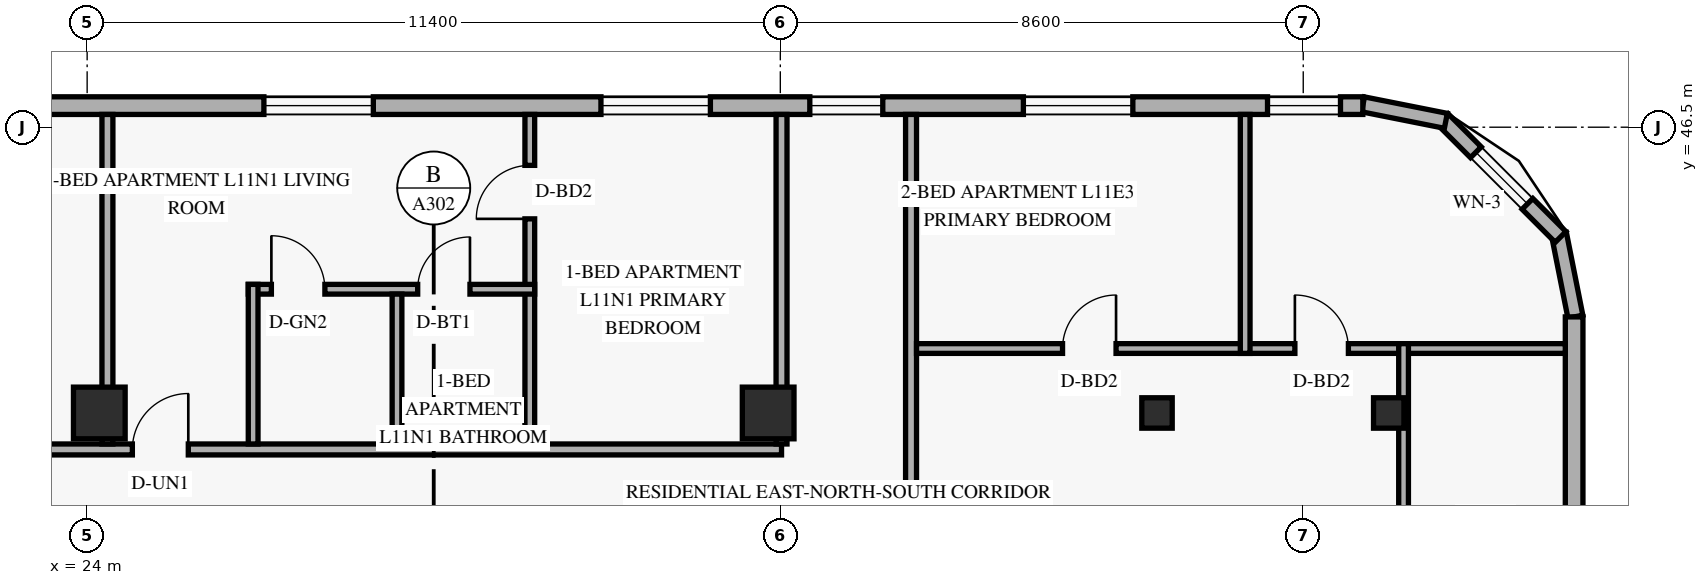
"""IFC4 building model, lengths in metres.
Left out: names, types, materials, properties, quantities, classifications, styles, units other than length and angle.
Written with IfcOpenShell. Run it as: python <this file> out.ifc"""

import sys

from ifc_helpers import new_model, si_unit, direction, frame, frame_2d, origin, origin_2d, place, context, subcontext, project, spatial, rectangle, hollow_rectangle, extrude, element, fill, save


model = new_model("IFC4")
c1 = context("Model", 3, precision=1e-05, world=origin(), true_north=direction((0.0, 1.0)))
c2 = subcontext(c1, "Body", "Model", "MODEL_VIEW")
j1 = project(units=[si_unit("LENGTHUNIT", "METRE"), si_unit("PLANEANGLEUNIT", "RADIAN")], contexts=[c1])
p1 = place(None, origin())
s1 = spatial("IfcSite", under=j1, at=p1, CompositionType="ELEMENT")
p2 = place(p1, origin())
s2 = spatial("IfcBuilding", under=s1, at=p2, CompositionType="ELEMENT")
p3 = place(p2, frame((0.0, 0.0, 45.6)))
s3 = spatial("IfcBuildingStorey", under=s2, at=p3, CompositionType="ELEMENT", Elevation=45.6)
for number, where, z_axis, x_axis in (
    (1, (24.2, 41.8, 0.0), (0.0, 0.0, 1.0), (1.0, 0.0, 0.0)),
    (2, (35.2, 41.8, 0.0), (0.0, 0.0, 1.0), (1.0, 0.0, 0.0)),
):
    element("IfcColumn", number, at=place(p3, frame(where, z_axis=z_axis, x_axis=x_axis)), inside=s3, PredefinedType="COLUMN", context=c2, shape_type="SweptSolid", body=[
        extrude(rectangle(XDim=0.85, YDim=0.85, at=origin_2d()), origin(), (0.0, 0.0, 1.0), 3.6),
    ])
p4 = place(p3, frame((41.532, 41.8, 0.0), z_axis=(0.034973505036, 0.0, 0.999388239847), x_axis=(0.0, 1.0, 0.0)))
e3 = element("IfcColumn", 3, at=p4, inside=s3, PredefinedType="COLUMN", context=c2, shape_type="SweptSolid", body=[
    extrude(hollow_rectangle(XDim=0.5, YDim=0.5, WallThickness=0.022, at=origin_2d()), origin(), (0.0, 0.0, 1.0), 3.602),
])
p5 = place(p3, frame((45.302, 41.8, 0.0), z_axis=(0.057955997462, 0.0, 0.998319138531), x_axis=(0.0, 1.0, 0.0)))
e4 = element("IfcColumn", 4, at=p5, inside=s3, PredefinedType="COLUMN", context=c2, shape_type="SweptSolid", body=[
    extrude(hollow_rectangle(XDim=0.5, YDim=0.5, WallThickness=0.022, at=origin_2d()), origin(), (0.0, 0.0, 1.0), 3.606),
])
p6 = place(p3, frame((48.476, 43.384, 0.0), z_axis=(0.0, 0.0, 1.0), x_axis=(-0.19496651342, 0.980809899341, 0.0)))
e5 = element("IfcWall", 5, at=p6, inside=s3, PredefinedType="SOLIDWALL", context=c2, shape_type="SweptSolid", body=[
    extrude(rectangle(XDim=1.389, YDim=0.25, at=frame_2d((0.694, 0.0))), origin(), (0.0, 0.0, 1.0), 3.36),
])
p7 = place(p3, frame((48.232, 44.695, 0.0), z_axis=(0.0, 0.0, 1.0), x_axis=(-0.707106781187, 0.707106781187, 0.0)))
e6 = element("IfcWall", 6, at=p7, inside=s3, PredefinedType="SOLIDWALL", context=c2, shape_type="SweptSolid", body=[
    extrude(rectangle(XDim=2.739, YDim=0.25, at=frame_2d((1.37, 0.0))), origin(), (0.0, 0.0, 1.0), 3.36),
])
p8 = place(p7, frame((0.77, 0.0, 0.85)))
e7 = element("IfcOpeningElement", 7, at=p8, cuts=e6, PredefinedType="OPENING", context=c2, shape_type="SweptSolid", body=[
    extrude(rectangle(XDim=1.2, YDim=1.5, at=frame_2d((0.6, 0.75))), frame((0.0, 0.135, 0.0), z_axis=(0.0, -1.0, 0.0), x_axis=(1.0, 0.0, 0.0)), (0.0, 0.0, 1.0), 0.27),
])
p9 = place(p3, frame((46.345, 46.605, 0.0), z_axis=(0.0, 0.0, 1.0), x_axis=(-0.980809899341, 0.19496651342, 0.0)))
e8 = element("IfcWall", 8, at=p9, inside=s3, PredefinedType="SOLIDWALL", context=c2, shape_type="SweptSolid", body=[
    extrude(rectangle(XDim=1.389, YDim=0.25, at=frame_2d((0.694, 0.0))), origin(), (0.0, 0.0, 1.0), 3.36),
])
p10 = place(p3, frame((48.455, 4.62, 0.0), z_axis=(0.0, 0.0, 1.0), x_axis=(0.0, 1.0, 0.0)))
e9 = element("IfcWall", 9, at=p10, inside=s3, PredefinedType="SOLIDWALL", context=c2, shape_type="SweptSolid", body=[
    extrude(rectangle(XDim=38.76, YDim=0.29, at=frame_2d((19.38, 0.0))), origin(), (0.0, 0.0, 1.0), 3.36),
])
p11 = place(p10, frame((5.64, 0.0, 0.85)))
e10 = element("IfcOpeningElement", 10, at=p11, cuts=e9, PredefinedType="OPENING", context=c2, shape_type="SweptSolid", body=[
    extrude(rectangle(XDim=1.2, YDim=1.5, at=frame_2d((0.6, 0.75))), frame((0.0, 0.155, 0.0), z_axis=(0.0, -1.0, 0.0), x_axis=(1.0, 0.0, 0.0)), (0.0, 0.0, 1.0), 0.31),
])
p12 = place(p10, frame((13.784, 0.0, 0.85)))
e11 = element("IfcOpeningElement", 11, at=p12, cuts=e9, PredefinedType="OPENING", context=c2, shape_type="SweptSolid", body=[
    extrude(rectangle(XDim=1.2, YDim=1.5, at=frame_2d((0.6, 0.75))), frame((0.0, 0.155, 0.0), z_axis=(0.0, -1.0, 0.0), x_axis=(1.0, 0.0, 0.0)), (0.0, 0.0, 1.0), 0.31),
])
p13 = place(p10, frame((19.359, 0.0, 0.85)))
e12 = element("IfcOpeningElement", 12, at=p13, cuts=e9, PredefinedType="OPENING", context=c2, shape_type="SweptSolid", body=[
    extrude(rectangle(XDim=1.2, YDim=1.5, at=frame_2d((0.6, 0.75))), frame((0.0, 0.155, 0.0), z_axis=(0.0, -1.0, 0.0), x_axis=(1.0, 0.0, 0.0)), (0.0, 0.0, 1.0), 0.31),
])
p14 = place(p10, frame((25.275, 0.0, 0.85)))
e13 = element("IfcOpeningElement", 13, at=p14, cuts=e9, PredefinedType="OPENING", context=c2, shape_type="SweptSolid", body=[
    extrude(rectangle(XDim=1.2, YDim=1.5, at=frame_2d((0.6, 0.75))), frame((0.0, 0.155, 0.0), z_axis=(0.0, -1.0, 0.0), x_axis=(1.0, 0.0, 0.0)), (0.0, 0.0, 1.0), 0.31),
])
p15 = place(p10, frame((32.58, 0.0, 0.85)))
e14 = element("IfcOpeningElement", 14, at=p15, cuts=e9, PredefinedType="OPENING", context=c2, shape_type="SweptSolid", body=[
    extrude(rectangle(XDim=1.2, YDim=1.5, at=frame_2d((0.6, 0.75))), frame((0.0, 0.155, 0.0), z_axis=(0.0, -1.0, 0.0), x_axis=(1.0, 0.0, 0.0)), (0.0, 0.0, 1.0), 0.31),
])
p16 = place(p3, frame((44.98, 46.855, 0.0), z_axis=(0.0, 0.0, 1.0), x_axis=(-1.0, 0.0, 0.0)))
e15 = element("IfcWall", 15, at=p16, inside=s3, PredefinedType="SOLIDWALL", context=c2, shape_type="SweptSolid", body=[
    extrude(rectangle(XDim=39.56, YDim=0.29, at=frame_2d((19.78, 0.0))), origin(), (0.0, 0.0, 1.0), 3.36),
])
p17 = place(p16, frame((35.22, 0.0, 0.85)))
e16 = element("IfcOpeningElement", 16, at=p17, cuts=e15, PredefinedType="OPENING", context=c2, shape_type="SweptSolid", body=[
    extrude(rectangle(XDim=1.8, YDim=1.6, at=frame_2d((0.9, 0.8))), frame((0.0, 0.155, 0.0), z_axis=(0.0, -1.0, 0.0), x_axis=(1.0, 0.0, 0.0)), (0.0, 0.0, 1.0), 0.31),
])
p18 = place(p16, frame((31.18, 0.0, 0.85)))
e17 = element("IfcOpeningElement", 17, at=p18, cuts=e15, PredefinedType="OPENING", context=c2, shape_type="SweptSolid", body=[
    extrude(rectangle(XDim=1.2, YDim=1.5, at=frame_2d((0.6, 0.75))), frame((0.0, 0.155, 0.0), z_axis=(0.0, -1.0, 0.0), x_axis=(1.0, 0.0, 0.0)), (0.0, 0.0, 1.0), 0.31),
])
p19 = place(p16, frame((24.863, 0.0, 0.85)))
e18 = element("IfcOpeningElement", 18, at=p19, cuts=e15, PredefinedType="OPENING", context=c2, shape_type="SweptSolid", body=[
    extrude(rectangle(XDim=1.8, YDim=1.6, at=frame_2d((0.9, 0.8))), frame((0.0, 0.155, 0.0), z_axis=(0.0, -1.0, 0.0), x_axis=(1.0, 0.0, 0.0)), (0.0, 0.0, 1.0), 0.31),
])
p20 = place(p16, frame((16.273, 0.0, 0.85)))
e19 = element("IfcOpeningElement", 19, at=p20, cuts=e15, PredefinedType="OPENING", context=c2, shape_type="SweptSolid", body=[
    extrude(rectangle(XDim=1.8, YDim=1.6, at=frame_2d((0.9, 0.8))), frame((0.0, 0.155, 0.0), z_axis=(0.0, -1.0, 0.0), x_axis=(1.0, 0.0, 0.0)), (0.0, 0.0, 1.0), 0.31),
])
p21 = place(p16, frame((10.73, 0.0, 0.85)))
e20 = element("IfcOpeningElement", 20, at=p21, cuts=e15, PredefinedType="OPENING", context=c2, shape_type="SweptSolid", body=[
    extrude(rectangle(XDim=1.8, YDim=1.6, at=frame_2d((0.9, 0.8))), frame((0.0, 0.155, 0.0), z_axis=(0.0, -1.0, 0.0), x_axis=(1.0, 0.0, 0.0)), (0.0, 0.0, 1.0), 0.31),
])
p22 = place(p16, frame((7.895, 0.0, 0.85)))
e21 = element("IfcOpeningElement", 21, at=p22, cuts=e15, PredefinedType="OPENING", context=c2, shape_type="SweptSolid", body=[
    extrude(rectangle(XDim=1.2, YDim=1.5, at=frame_2d((0.6, 0.75))), frame((0.0, 0.155, 0.0), z_axis=(0.0, -1.0, 0.0), x_axis=(1.0, 0.0, 0.0)), (0.0, 0.0, 1.0), 0.31),
])
p23 = place(p16, frame((3.782, 0.0, 0.85)))
e22 = element("IfcOpeningElement", 22, at=p23, cuts=e15, PredefinedType="OPENING", context=c2, shape_type="SweptSolid", body=[
    extrude(rectangle(XDim=1.8, YDim=1.6, at=frame_2d((0.9, 0.8))), frame((0.0, 0.155, 0.0), z_axis=(0.0, -1.0, 0.0), x_axis=(1.0, 0.0, 0.0)), (0.0, 0.0, 1.0), 0.31),
])
p24 = place(p16, frame((0.367, 0.0, 0.85)))
e23 = element("IfcOpeningElement", 23, at=p24, cuts=e15, PredefinedType="OPENING", context=c2, shape_type="SweptSolid", body=[
    extrude(rectangle(XDim=1.2, YDim=1.5, at=frame_2d((0.6, 0.75))), frame((0.0, 0.155, 0.0), z_axis=(0.0, -1.0, 0.0), x_axis=(1.0, 0.0, 0.0)), (0.0, 0.0, 1.0), 0.31),
])
p25 = place(p3, frame((37.55, 1.29, 0.0), z_axis=(0.0, 0.0, 1.0), x_axis=(0.0, 1.0, 0.0)))
e24 = element("IfcWall", 24, at=p25, inside=s3, PredefinedType="STANDARD", context=c2, shape_type="SweptSolid", body=[
    extrude(rectangle(XDim=45.42, YDim=0.18, at=frame_2d((22.71, 0.0))), origin(), (0.0, 0.0, 1.0), 2.649),
])
p26 = place(p25, frame((13.943, 0.0, 0.0)))
e25 = element("IfcOpeningElement", 25, at=p26, cuts=e24, PredefinedType="OPENING", context=c2, shape_type="SweptSolid", body=[
    extrude(rectangle(XDim=0.92, YDim=2.15, at=frame_2d((0.46, 1.075))), frame((0.0, 0.1, 0.0), z_axis=(0.0, -1.0, 0.0), x_axis=(1.0, 0.0, 0.0)), (0.0, 0.0, 1.0), 0.2),
])
p27 = place(p25, frame((20.953, 0.0, 0.0)))
e26 = element("IfcOpeningElement", 26, at=p27, cuts=e24, PredefinedType="OPENING", context=c2, shape_type="SweptSolid", body=[
    extrude(rectangle(XDim=0.92, YDim=2.15, at=frame_2d((0.46, 1.075))), frame((0.0, 0.1, 0.0), z_axis=(0.0, -1.0, 0.0), x_axis=(1.0, 0.0, 0.0)), (0.0, 0.0, 1.0), 0.2),
])
p28 = place(p25, frame((36.635, 0.0, 0.0)))
e27 = element("IfcOpeningElement", 27, at=p28, cuts=e24, PredefinedType="OPENING", context=c2, shape_type="SweptSolid", body=[
    extrude(rectangle(XDim=0.92, YDim=2.15, at=frame_2d((0.46, 1.075))), frame((0.0, 0.1, 0.0), z_axis=(0.0, -1.0, 0.0), x_axis=(1.0, 0.0, 0.0)), (0.0, 0.0, 1.0), 0.2),
])
p29 = place(p3, frame((14.1, 41.2, 0.0), z_axis=(0.0, 0.0, 1.0), x_axis=(1.0, 0.0, 0.0)))
e28 = element("IfcWall", 28, at=p29, inside=s3, PredefinedType="STANDARD", context=c2, shape_type="SweptSolid", body=[
    extrude(rectangle(XDim=21.32, YDim=0.18, at=frame_2d((10.66, 0.0))), origin(), (0.0, 0.0, 1.0), 2.649),
])
p30 = place(p29, frame((1.6, 0.0, 0.0)))
e29 = element("IfcOpeningElement", 29, at=p30, cuts=e28, PredefinedType="OPENING", context=c2, shape_type="SweptSolid", body=[
    extrude(rectangle(XDim=0.95, YDim=2.15, at=frame_2d((0.475, 1.075))), frame((0.0, 0.1, 0.0), z_axis=(0.0, -1.0, 0.0), x_axis=(1.0, 0.0, 0.0)), (0.0, 0.0, 1.0), 0.2),
])
p31 = place(p29, frame((10.644, 0.0, 0.0)))
e30 = element("IfcOpeningElement", 30, at=p31, cuts=e28, PredefinedType="OPENING", context=c2, shape_type="SweptSolid", body=[
    extrude(rectangle(XDim=0.92, YDim=2.15, at=frame_2d((0.46, 1.075))), frame((0.0, 0.1, 0.0), z_axis=(0.0, -1.0, 0.0), x_axis=(1.0, 0.0, 0.0)), (0.0, 0.0, 1.0), 0.2),
])
p32 = place(p3, frame((35.42, 41.29, 0.0), z_axis=(0.0, 0.0, 1.0), x_axis=(0.0, 1.0, 0.0)))
e31 = element("IfcWall", 31, at=p32, inside=s3, PredefinedType="PARTITIONING", context=c2, shape_type="SweptSolid", body=[
    extrude(rectangle(XDim=5.42, YDim=0.18, at=frame_2d((2.71, 0.0))), origin(), (0.0, 0.0, 1.0), 3.36),
])
p33 = place(p3, frame((37.64, 42.86, 0.0), z_axis=(0.0, 0.0, 1.0), x_axis=(1.0, 0.0, 0.0)))
e32 = element("IfcWall", 32, at=p33, inside=s3, PredefinedType="PARTITIONING", context=c2, shape_type="SweptSolid", body=[
    extrude(rectangle(XDim=10.67, YDim=0.16, at=frame_2d((5.335, 0.0))), origin(), (0.0, 0.0, 1.0), 3.36),
])
p34 = place(p33, frame((2.402, 0.0, 0.0)))
e33 = element("IfcOpeningElement", 33, at=p34, cuts=e32, PredefinedType="OPENING", context=c2, shape_type="SweptSolid", body=[
    extrude(rectangle(XDim=0.88, YDim=2.14, at=frame_2d((0.44, 1.07))), frame((0.0, 0.09, 0.0), z_axis=(0.0, -1.0, 0.0), x_axis=(1.0, 0.0, 0.0)), (0.0, 0.0, 1.0), 0.18),
])
p35 = place(p33, frame((6.222, 0.0, 0.0)))
e34 = element("IfcOpeningElement", 34, at=p35, cuts=e32, PredefinedType="OPENING", context=c2, shape_type="SweptSolid", body=[
    extrude(rectangle(XDim=0.88, YDim=2.14, at=frame_2d((0.44, 1.07))), frame((0.0, 0.09, 0.0), z_axis=(0.0, -1.0, 0.0), x_axis=(1.0, 0.0, 0.0)), (0.0, 0.0, 1.0), 0.18),
])
p36 = place(p3, frame((45.65, 32.38, 0.0), z_axis=(0.0, 0.0, 1.0), x_axis=(0.0, 1.0, 0.0)))
e35 = element("IfcWall", 35, at=p36, inside=s3, PredefinedType="PARTITIONING", context=c2, shape_type="SweptSolid", body=[
    extrude(rectangle(XDim=10.56, YDim=0.16, at=frame_2d((5.28, 0.0))), origin(), (0.0, 0.0, 1.0), 2.809),
])
p37 = place(p36, frame((4.52, 0.0, 0.0)))
e36 = element("IfcOpeningElement", 36, at=p37, cuts=e35, PredefinedType="OPENING", context=c2, shape_type="SweptSolid", body=[
    extrude(rectangle(XDim=0.95, YDim=2.15, at=frame_2d((0.475, 1.075))), frame((0.0, 0.09, 0.0), z_axis=(0.0, -1.0, 0.0), x_axis=(1.0, 0.0, 0.0)), (0.0, 0.0, 1.0), 0.18),
])
p38 = place(p3, frame((43.045, 42.78, 0.0), z_axis=(0.0, 0.0, 1.0), x_axis=(0.0, 1.0, 0.0)))
e37 = element("IfcWall", 37, at=p38, inside=s3, PredefinedType="PARTITIONING", context=c2, shape_type="SweptSolid", body=[
    extrude(rectangle(XDim=3.93, YDim=0.16, at=frame_2d((1.965, 0.0))), origin(), (0.0, 0.0, 1.0), 3.36),
])
p39 = place(p3, frame((24.333, 41.29, 0.0), z_axis=(0.0, 0.0, 1.0), x_axis=(0.0, 1.0, 0.0)))
e38 = element("IfcWall", 38, at=p39, inside=s3, PredefinedType="PARTITIONING", context=c2, shape_type="SweptSolid", body=[
    extrude(rectangle(XDim=5.42, YDim=0.18, at=frame_2d((2.71, 0.0))), origin(), (0.0, 0.0, 1.0), 2.649),
])
p40 = place(p3, frame((31.28, 41.29, 0.0), z_axis=(0.0, 0.0, 1.0), x_axis=(0.0, 1.0, 0.0)))
e39 = element("IfcWall", 39, at=p40, inside=s3, PredefinedType="PARTITIONING", context=c2, shape_type="SweptSolid", body=[
    extrude(rectangle(XDim=5.42, YDim=0.16, at=frame_2d((2.71, 0.0))), origin(), (0.0, 0.0, 1.0), 2.809),
])
p41 = place(p40, frame((3.702, 0.0, 0.0)))
e40 = element("IfcOpeningElement", 40, at=p41, cuts=e39, PredefinedType="OPENING", context=c2, shape_type="SweptSolid", body=[
    extrude(rectangle(XDim=0.88, YDim=2.14, at=frame_2d((0.44, 1.07))), frame((0.0, 0.09, 0.0), z_axis=(0.0, -1.0, 0.0), x_axis=(1.0, 0.0, 0.0)), (0.0, 0.0, 1.0), 0.18),
])
p42 = place(p3, frame((26.65, 43.835, 0.0), z_axis=(0.0, 0.0, 1.0), x_axis=(1.0, 0.0, 0.0)))
e41 = element("IfcWall", 41, at=p42, inside=s3, PredefinedType="PLUMBINGWALL", context=c2, shape_type="SweptSolid", body=[
    extrude(rectangle(XDim=4.71, YDim=0.16, at=frame_2d((2.355, 0.0))), origin(), (0.0, 0.0, 1.0), 3.36),
])
p43 = place(p42, frame((0.38, 0.0, 0.0)))
e42 = element("IfcOpeningElement", 42, at=p43, cuts=e41, PredefinedType="OPENING", context=c2, shape_type="SweptSolid", body=[
    extrude(rectangle(XDim=0.88, YDim=2.12, at=frame_2d((0.44, 1.06))), frame((0.0, 0.09, 0.0), z_axis=(0.0, -1.0, 0.0), x_axis=(1.0, 0.0, 0.0)), (0.0, 0.0, 1.0), 0.18),
])
p44 = place(p42, frame((2.786, 0.0, 0.0)))
e43 = element("IfcOpeningElement", 43, at=p44, cuts=e41, PredefinedType="OPENING", context=c2, shape_type="SweptSolid", body=[
    extrude(rectangle(XDim=0.86, YDim=2.12, at=frame_2d((0.43, 1.06))), frame((0.0, 0.09, 0.0), z_axis=(0.0, -1.0, 0.0), x_axis=(1.0, 0.0, 0.0)), (0.0, 0.0, 1.0), 0.18),
])
p45 = place(p3, frame((26.73, 41.29, 0.0), z_axis=(0.0, 0.0, 1.0), x_axis=(0.0, 1.0, 0.0)))
e44 = element("IfcWall", 44, at=p45, inside=s3, PredefinedType="PLUMBINGWALL", context=c2, shape_type="SweptSolid", body=[
    extrude(rectangle(XDim=2.625, YDim=0.16, at=frame_2d((1.312, 0.0))), origin(), (0.0, 0.0, 1.0), 2.809),
])
p46 = place(p3, frame((29.096, 41.29, 0.0), z_axis=(0.0, 0.0, 1.0), x_axis=(0.0, 1.0, 0.0)))
e45 = element("IfcWall", 45, at=p46, inside=s3, PredefinedType="PLUMBINGWALL", context=c2, shape_type="SweptSolid", body=[
    extrude(rectangle(XDim=2.465, YDim=0.16, at=frame_2d((1.232, 0.0))), origin(), (0.0, 0.0, 1.0), 2.809),
])
p47 = place(p8, origin())
e46 = element("IfcWindow", 46, at=p47, inside=s3, PartitioningType="SINGLE_PANEL", PredefinedType="WINDOW", context=c2, shape_type="SweptSolid", body=[
    extrude(rectangle(XDim=1.2, YDim=1.5, at=frame_2d((0.6, 0.75))), frame((0.0, 0.03, 0.0), z_axis=(0.0, -1.0, 0.0), x_axis=(1.0, 0.0, 0.0)), (0.0, 0.0, 1.0), 0.06),
])
fill(e7, e46)
p48 = place(p20, origin())
e47 = element("IfcWindow", 47, at=p48, inside=s3, PartitioningType="SINGLE_PANEL", PredefinedType="WINDOW", context=c2, shape_type="SweptSolid", body=[
    extrude(rectangle(XDim=1.8, YDim=1.6, at=frame_2d((0.9, 0.8))), frame((0.0, 0.03, 0.0), z_axis=(0.0, -1.0, 0.0), x_axis=(1.0, 0.0, 0.0)), (0.0, 0.0, 1.0), 0.06),
])
fill(e19, e47)
p49 = place(p21, origin())
e48 = element("IfcWindow", 48, at=p49, inside=s3, PartitioningType="SINGLE_PANEL", PredefinedType="WINDOW", context=c2, shape_type="SweptSolid", body=[
    extrude(rectangle(XDim=1.8, YDim=1.6, at=frame_2d((0.9, 0.8))), frame((0.0, 0.03, 0.0), z_axis=(0.0, -1.0, 0.0), x_axis=(1.0, 0.0, 0.0)), (0.0, 0.0, 1.0), 0.06),
])
fill(e20, e48)
p50 = place(p22, origin())
e49 = element("IfcWindow", 49, at=p50, inside=s3, PartitioningType="SINGLE_PANEL", PredefinedType="WINDOW", context=c2, shape_type="SweptSolid", body=[
    extrude(rectangle(XDim=1.2, YDim=1.5, at=frame_2d((0.6, 0.75))), frame((0.0, 0.03, 0.0), z_axis=(0.0, -1.0, 0.0), x_axis=(1.0, 0.0, 0.0)), (0.0, 0.0, 1.0), 0.06),
])
fill(e21, e49)
p51 = place(p23, origin())
e50 = element("IfcWindow", 50, at=p51, inside=s3, PartitioningType="SINGLE_PANEL", PredefinedType="WINDOW", context=c2, shape_type="SweptSolid", body=[
    extrude(rectangle(XDim=1.8, YDim=1.6, at=frame_2d((0.9, 0.8))), frame((0.0, 0.03, 0.0), z_axis=(0.0, -1.0, 0.0), x_axis=(1.0, 0.0, 0.0)), (0.0, 0.0, 1.0), 0.06),
])
fill(e22, e50)
p52 = place(p24, origin())
e51 = element("IfcWindow", 51, at=p52, inside=s3, PartitioningType="SINGLE_PANEL", PredefinedType="WINDOW", context=c2, shape_type="SweptSolid", body=[
    extrude(rectangle(XDim=1.2, YDim=1.5, at=frame_2d((0.6, 0.75))), frame((0.0, 0.03, 0.0), z_axis=(0.0, -1.0, 0.0), x_axis=(1.0, 0.0, 0.0)), (0.0, 0.0, 1.0), 0.06),
])
fill(e23, e51)
p53 = place(p34, origin())
e52 = element("IfcDoor", 52, at=p53, inside=s3, OperationType="SINGLE_SWING_RIGHT", PredefinedType="DOOR", context=c2, shape_type="SweptSolid", body=[
    extrude(rectangle(XDim=0.88, YDim=2.14, at=frame_2d((0.44, 1.07))), frame((0.0, 0.025, 0.0), z_axis=(0.0, -1.0, 0.0), x_axis=(1.0, 0.0, 0.0)), (0.0, 0.0, 1.0), 0.05),
])
fill(e33, e52)
p54 = place(p35, origin())
e53 = element("IfcDoor", 53, at=p54, inside=s3, OperationType="SINGLE_SWING_LEFT", PredefinedType="DOOR", context=c2, shape_type="SweptSolid", body=[
    extrude(rectangle(XDim=0.88, YDim=2.14, at=frame_2d((0.44, 1.07))), frame((0.0, 0.025, 0.0), z_axis=(0.0, -1.0, 0.0), x_axis=(1.0, 0.0, 0.0)), (0.0, 0.0, 1.0), 0.05),
])
fill(e34, e53)
p55 = place(p31, origin())
e54 = element("IfcDoor", 54, at=p55, inside=s3, OperationType="SINGLE_SWING_RIGHT", PredefinedType="DOOR", context=c2, shape_type="SweptSolid", body=[
    extrude(rectangle(XDim=0.92, YDim=2.15, at=frame_2d((0.46, 1.075))), frame((0.0, 0.025, 0.0), z_axis=(0.0, -1.0, 0.0), x_axis=(1.0, 0.0, 0.0)), (0.0, 0.0, 1.0), 0.05),
])
fill(e30, e54)
p56 = place(p43, origin())
e55 = element("IfcDoor", 55, at=p56, inside=s3, OperationType="SINGLE_SWING_LEFT", PredefinedType="DOOR", context=c2, shape_type="SweptSolid", body=[
    extrude(rectangle(XDim=0.88, YDim=2.12, at=frame_2d((0.44, 1.06))), frame((0.0, 0.025, 0.0), z_axis=(0.0, -1.0, 0.0), x_axis=(1.0, 0.0, 0.0)), (0.0, 0.0, 1.0), 0.05),
])
fill(e42, e55)
p57 = place(p44, origin())
e56 = element("IfcDoor", 56, at=p57, inside=s3, OperationType="SINGLE_SWING_RIGHT", PredefinedType="DOOR", context=c2, shape_type="SweptSolid", body=[
    extrude(rectangle(XDim=0.86, YDim=2.12, at=frame_2d((0.43, 1.06))), frame((0.0, 0.025, 0.0), z_axis=(0.0, -1.0, 0.0), x_axis=(1.0, 0.0, 0.0)), (0.0, 0.0, 1.0), 0.05),
])
fill(e43, e56)
p58 = place(p41, origin())
e57 = element("IfcDoor", 57, at=p58, inside=s3, OperationType="SINGLE_SWING_LEFT", PredefinedType="DOOR", context=c2, shape_type="SweptSolid", body=[
    extrude(rectangle(XDim=0.88, YDim=2.14, at=frame_2d((0.44, 1.07))), frame((0.0, 0.025, 0.0), z_axis=(0.0, -1.0, 0.0), x_axis=(1.0, 0.0, 0.0)), (0.0, 0.0, 1.0), 0.05),
])
fill(e40, e57)
save(model, sys.argv[1])
